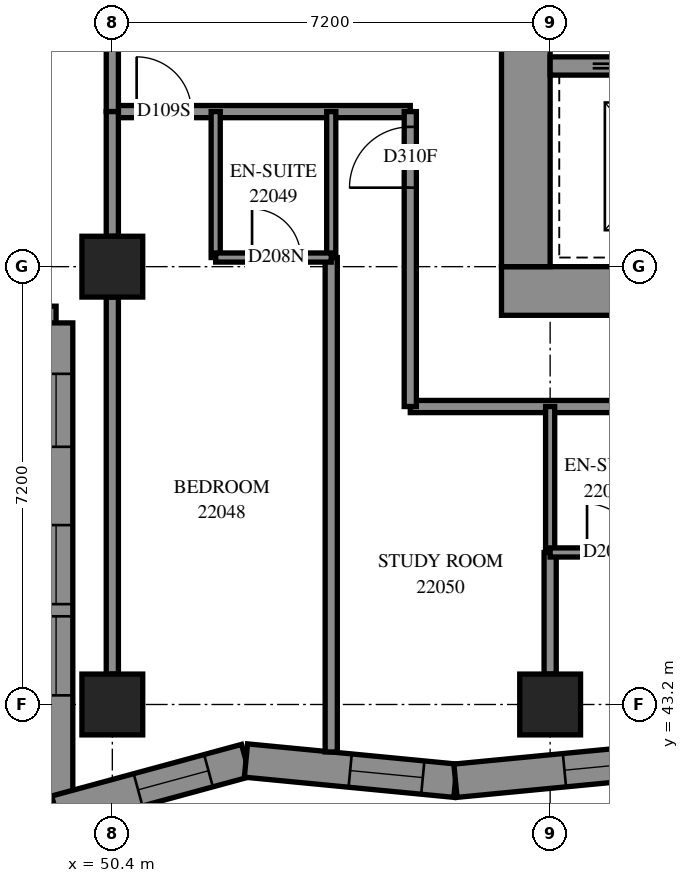
"""IFC4 building model, lengths in metres.
Left out: names, types, materials, properties, quantities, classifications, styles, units other than length and angle.
Written with IfcOpenShell. Run it as: python <this file> out.ifc"""

import sys

from ifc_helpers import new_model, si_unit, direction, frame, frame_2d, origin, origin_2d, place, context, subcontext, project, spatial, polyline, rectangle, outline, extrude, element, fill, save


model = new_model("IFC4")
c1 = context("Model", 3, precision=1e-05, world=origin(), true_north=direction((0.0, 1.0)))
c2 = subcontext(c1, "Body", "Model", "MODEL_VIEW")
j1 = project(units=[si_unit("LENGTHUNIT", "METRE"), si_unit("PLANEANGLEUNIT", "RADIAN")], contexts=[c1])
p1 = place(None, origin())
s1 = spatial("IfcSite", under=j1, at=p1, CompositionType="ELEMENT")
p2 = place(p1, origin())
s2 = spatial("IfcBuilding", under=s1, at=p2, CompositionType="ELEMENT")
p3 = place(p2, frame((0.0, 0.0, 84.6)))
s3 = spatial("IfcBuildingStorey", under=s2, at=p3, CompositionType="ELEMENT", Elevation=84.6)
for number, where, z_axis, x_axis in (
    (1, (50.4, 43.2, 0.0), (0.0, 0.0, 1.0), (1.0, 0.0, 0.0)),
    (2, (50.4, 50.4, 0.0), (0.0, 0.0, 1.0), (1.0, 0.0, 0.0)),
    (3, (57.6, 43.2, 0.0), (0.0, 0.0, 1.0), (1.0, 0.0, 0.0)),
):
    element("IfcColumn", number, at=place(p3, frame(where, z_axis=z_axis, x_axis=x_axis)), inside=s3, PredefinedType="COLUMN", context=c2, shape_type="SweptSolid", body=[
        extrude(rectangle(XDim=1.0, YDim=1.0, at=origin_2d()), origin(), (0.0, 0.0, 1.0), 3.1),
    ])
p4 = place(p3, frame((56.8, 50.0, -0.3), z_axis=(0.0, 0.0, 1.0), x_axis=(1.0, 0.0, 0.0)))
e4 = element("IfcWall", 4, at=p4, inside=s3, PredefinedType="SHEAR", context=c2, shape_type="SweptSolid", body=[
    extrude(rectangle(XDim=16.0, YDim=0.8, at=frame_2d((8.0, 0.0))), origin(), (0.0, 0.0, 1.0), 2.7),
])
p5 = place(p3, frame((57.2, 50.4, -0.3), z_axis=(0.0, 0.0, 1.0), x_axis=(0.0, 1.0, 0.0)))
e5 = element("IfcWall", 5, at=p5, inside=s3, PredefinedType="SHEAR", context=c2, shape_type="SweptSolid", body=[
    extrude(rectangle(XDim=14.4, YDim=0.8, at=frame_2d((7.2, 0.0))), origin(), (0.0, 0.0, 1.0), 2.7),
])
p6 = place(p5, frame((4.55, 0.0, 0.3)))
e6 = element("IfcOpeningElement", 6, at=p6, cuts=e5, PredefinedType="OPENING", context=c2, shape_type="SweptSolid", body=[
    extrude(rectangle(XDim=1.1, YDim=2.1, at=frame_2d((0.55, 1.05))), frame((0.0, 0.41, 0.0), z_axis=(0.0, -1.0, 0.0), x_axis=(1.0, 0.0, 0.0)), (0.0, 0.0, 1.0), 0.82),
])
p7 = place(p5, frame((11.35, 0.0, 0.3)))
e7 = element("IfcOpeningElement", 7, at=p7, cuts=e5, PredefinedType="OPENING", context=c2, shape_type="SweptSolid", body=[
    extrude(rectangle(XDim=1.1, YDim=2.1, at=frame_2d((0.55, 1.05))), frame((0.0, 0.41, 0.0), z_axis=(0.0, -1.0, 0.0), x_axis=(1.0, 0.0, 0.0)), (0.0, 0.0, 1.0), 0.82),
])
p8 = place(p3, frame((57.6, 53.7, 0.0), z_axis=(0.0, 0.0, 1.0), x_axis=(1.0, 0.0, 0.0)))
e8 = element("IfcWall", 8, at=p8, inside=s3, PredefinedType="SOLIDWALL", context=c2, shape_type="SweptSolid", body=[
    extrude(rectangle(XDim=14.4, YDim=0.3, at=frame_2d((7.2, 0.0))), origin(), (0.0, 0.0, 1.0), 3.1),
])
p9 = place(p8, frame((1.25, 0.0, 0.0)))
e9 = element("IfcOpeningElement", 9, at=p9, cuts=e8, PredefinedType="OPENING", context=c2, shape_type="SweptSolid", body=[
    extrude(rectangle(XDim=1.1, YDim=2.1, at=frame_2d((0.55, 1.05))), frame((0.0, 0.16, 0.0), z_axis=(0.0, -1.0, 0.0), x_axis=(1.0, 0.0, 0.0)), (0.0, 0.0, 1.0), 0.32),
])
p10 = place(p8, frame((4.85, 0.0, 0.0)))
e10 = element("IfcOpeningElement", 10, at=p10, cuts=e8, PredefinedType="OPENING", context=c2, shape_type="SweptSolid", body=[
    extrude(rectangle(XDim=1.1, YDim=2.1, at=frame_2d((0.55, 1.05))), frame((0.0, 0.16, 0.0), z_axis=(0.0, -1.0, 0.0), x_axis=(1.0, 0.0, 0.0)), (0.0, 0.0, 1.0), 0.32),
])
p11 = place(p8, frame((8.45, 0.0, 0.0)))
e11 = element("IfcOpeningElement", 11, at=p11, cuts=e8, PredefinedType="OPENING", context=c2, shape_type="SweptSolid", body=[
    extrude(rectangle(XDim=1.1, YDim=2.1, at=frame_2d((0.55, 1.05))), frame((0.0, 0.16, 0.0), z_axis=(0.0, -1.0, 0.0), x_axis=(1.0, 0.0, 0.0)), (0.0, 0.0, 1.0), 0.32),
])
p12 = place(p8, frame((12.05, 0.0, 0.0)))
e12 = element("IfcOpeningElement", 12, at=p12, cuts=e8, PredefinedType="OPENING", context=c2, shape_type="SweptSolid", body=[
    extrude(rectangle(XDim=1.1, YDim=2.1, at=frame_2d((0.55, 1.05))), frame((0.0, 0.16, 0.0), z_axis=(0.0, -1.0, 0.0), x_axis=(1.0, 0.0, 0.0)), (0.0, 0.0, 1.0), 0.32),
])
p13 = place(p3, frame((42.275, 49.475, 0.0), z_axis=(0.0, 0.0, 1.0), x_axis=(1.0, 0.0, 0.0)))
e13 = element("IfcWall", 13, at=p13, inside=s3, PredefinedType="SOLIDWALL", context=c2, shape_type="SweptSolid", body=[
    extrude(outline(polyline([(-0.275, -0.275), (6.925, -0.275), (7.475, 0.275), (0.275, 0.275), (-0.275, -0.275)])), origin(), (0.0, 0.0, 1.0), 3.1),
])
p14 = place(p13, frame((1.325, 0.0, 0.5)))
e14 = element("IfcOpeningElement", 14, at=p14, cuts=e13, PredefinedType="OPENING", context=c2, shape_type="SweptSolid", body=[
    extrude(rectangle(XDim=1.3, YDim=2.45, at=frame_2d((0.65, 1.225))), frame((0.0, 0.285, 0.0), z_axis=(0.0, -1.0, 0.0), x_axis=(1.0, 0.0, 0.0)), (0.0, 0.0, 1.0), 0.57),
])
p15 = place(p13, frame((2.825, 0.0, 0.5)))
e15 = element("IfcOpeningElement", 15, at=p15, cuts=e13, PredefinedType="OPENING", context=c2, shape_type="SweptSolid", body=[
    extrude(rectangle(XDim=1.3, YDim=2.45, at=frame_2d((0.65, 1.225))), frame((0.0, 0.285, 0.0), z_axis=(0.0, -1.0, 0.0), x_axis=(1.0, 0.0, 0.0)), (0.0, 0.0, 1.0), 0.57),
])
p16 = place(p13, frame((5.162, 0.0, 0.5)))
e16 = element("IfcOpeningElement", 16, at=p16, cuts=e13, PredefinedType="OPENING", context=c2, shape_type="SweptSolid", body=[
    extrude(rectangle(XDim=1.2, YDim=2.45, at=frame_2d((0.6, 1.225))), frame((0.0, 0.285, 0.0), z_axis=(0.0, -1.0, 0.0), x_axis=(1.0, 0.0, 0.0)), (0.0, 0.0, 1.0), 0.57),
])
p17 = place(p3, frame((49.475, 49.475, 0.0), z_axis=(0.0, 0.0, 1.0), x_axis=(0.0, -1.0, 0.0)))
e17 = element("IfcWall", 17, at=p17, inside=s3, PredefinedType="SOLIDWALL", context=c2, shape_type="SweptSolid", body=[
    extrude(outline(polyline([(0.275, -0.275), (8.405, -0.275), (7.686, 0.275), (-0.275, 0.275), (0.275, -0.275)])), origin(), (0.0, 0.0, 1.0), 3.1),
])
p18 = place(p17, frame((3.325, 0.0, 0.5)))
e18 = element("IfcOpeningElement", 18, at=p18, cuts=e17, PredefinedType="OPENING", context=c2, shape_type="SweptSolid", body=[
    extrude(rectangle(XDim=1.3, YDim=2.45, at=frame_2d((0.65, 1.225))), frame((0.0, 0.285, 0.0), z_axis=(0.0, -1.0, 0.0), x_axis=(1.0, 0.0, 0.0)), (0.0, 0.0, 1.0), 0.57),
])
p19 = place(p17, frame((4.825, 0.0, 0.5)))
e19 = element("IfcOpeningElement", 19, at=p19, cuts=e17, PredefinedType="OPENING", context=c2, shape_type="SweptSolid", body=[
    extrude(rectangle(XDim=1.3, YDim=2.45, at=frame_2d((0.65, 1.225))), frame((0.0, 0.285, 0.0), z_axis=(0.0, -1.0, 0.0), x_axis=(1.0, 0.0, 0.0)), (0.0, 0.0, 1.0), 0.57),
])
p20 = place(p17, frame((0.838, 0.0, 0.5)))
e20 = element("IfcOpeningElement", 20, at=p20, cuts=e17, PredefinedType="OPENING", context=c2, shape_type="SweptSolid", body=[
    extrude(rectangle(XDim=1.2, YDim=2.45, at=frame_2d((0.6, 1.225))), frame((0.0, 0.285, 0.0), z_axis=(0.0, -1.0, 0.0), x_axis=(1.0, 0.0, 0.0)), (0.0, 0.0, 1.0), 0.57),
])
p21 = place(p3, frame((49.475, 41.43, 0.0), z_axis=(0.0, 0.0, 1.0), x_axis=(0.9649788617, 0.262327651, 0.0)))
e21 = element("IfcWall", 21, at=p21, inside=s3, PredefinedType="SOLIDWALL", context=c2, shape_type="SweptSolid", body=[
    extrude(outline(polyline([(-0.36, -0.275), (3.186, -0.275), (3.286, 0.275), (0.36, 0.275), (-0.36, -0.275)])), origin(), (0.0, 0.0, 1.0), 3.1),
])
p22 = place(p21, frame((1.397, 0.0, 0.5)))
e22 = element("IfcOpeningElement", 22, at=p22, cuts=e21, PredefinedType="OPENING", context=c2, shape_type="SweptSolid", body=[
    extrude(rectangle(XDim=1.2, YDim=2.45, at=frame_2d((0.6, 1.225))), frame((0.0, 0.285, 0.0), z_axis=(0.0, -1.0, 0.0), x_axis=(1.0, 0.0, 0.0)), (0.0, 0.0, 1.0), 0.57),
])
p23 = place(p3, frame((52.598, 42.279, 0.0), z_axis=(0.0, 0.0, 1.0), x_axis=(0.9953800797, -0.0960130045, 0.0)))
e23 = element("IfcWall", 23, at=p23, inside=s3, PredefinedType="SOLIDWALL", context=c2, shape_type="SweptSolid", body=[
    extrude(outline(polyline([(0.05, -0.275), (3.487, -0.275), (3.434, 0.275), (-0.05, 0.275), (0.05, -0.275)])), origin(), (0.0, 0.0, 1.0), 3.1),
])
p24 = place(p23, frame((1.722, 0.0, 0.5)))
e24 = element("IfcOpeningElement", 24, at=p24, cuts=e23, PredefinedType="OPENING", context=c2, shape_type="SweptSolid", body=[
    extrude(rectangle(XDim=1.2, YDim=2.45, at=frame_2d((0.6, 1.225))), frame((0.0, 0.285, 0.0), z_axis=(0.0, -1.0, 0.0), x_axis=(1.0, 0.0, 0.0)), (0.0, 0.0, 1.0), 0.57),
])
p25 = place(p3, frame((56.043, 41.946, 0.0), z_axis=(0.0, 0.0, 1.0), x_axis=(0.995380467, 0.096008989, 0.0)))
e25 = element("IfcWall", 25, at=p25, inside=s3, PredefinedType="SOLIDWALL", context=c2, shape_type="SweptSolid", body=[
    extrude(outline(polyline([(-0.026, -0.275), (3.411, -0.275), (3.464, 0.275), (0.026, 0.275), (-0.026, -0.275)])), origin(), (0.0, 0.0, 1.0), 3.1),
])
p26 = place(p25, frame((1.801, 0.0, 0.5)))
e26 = element("IfcOpeningElement", 26, at=p26, cuts=e25, PredefinedType="OPENING", context=c2, shape_type="SweptSolid", body=[
    extrude(rectangle(XDim=1.2, YDim=2.45, at=frame_2d((0.6, 1.225))), frame((0.0, 0.285, 0.0), z_axis=(0.0, -1.0, 0.0), x_axis=(1.0, 0.0, 0.0)), (0.0, 0.0, 1.0), 0.57),
])
p27 = place(p3, frame((55.3, 48.1, 0.0), z_axis=(0.0, 0.0, 1.0), x_axis=(1.0, 0.0, 0.0)))
e27 = element("IfcWall", 27, at=p27, inside=s3, PredefinedType="PARTITIONING", context=c2, shape_type="SweptSolid", body=[
    extrude(rectangle(XDim=19.092, YDim=0.2, at=frame_2d((9.546, 0.0))), origin(), (0.0, 0.0, 1.0), 3.1),
])
p28 = place(p27, frame((6.199, 0.0, 0.0)))
e28 = element("IfcOpeningElement", 28, at=p28, cuts=e27, PredefinedType="OPENING", context=c2, shape_type="SweptSolid", body=[
    extrude(rectangle(XDim=0.9, YDim=2.1, at=frame_2d((0.45, 1.05))), frame((0.0, 0.11, 0.0), z_axis=(0.0, -1.0, 0.0), x_axis=(1.0, 0.0, 0.0)), (0.0, 0.0, 1.0), 0.22),
])
p29 = place(p27, frame((13.363, 0.0, 0.0)))
e29 = element("IfcOpeningElement", 29, at=p29, cuts=e27, PredefinedType="OPENING", context=c2, shape_type="SweptSolid", body=[
    extrude(rectangle(XDim=1.0, YDim=2.1, at=frame_2d((0.5, 1.05))), frame((0.0, 0.11, 0.0), z_axis=(0.0, -1.0, 0.0), x_axis=(1.0, 0.0, 0.0)), (0.0, 0.0, 1.0), 0.22),
])
p30 = place(p3, frame((54.0, 42.42, 0.0), z_axis=(0.0, 0.0, 1.0), x_axis=(0.0, 1.0, 0.0)))
e30 = element("IfcWall", 30, at=p30, inside=s3, PredefinedType="PARTITIONING", context=c2, shape_type="SweptSolid", body=[
    extrude(rectangle(XDim=8.13, YDim=0.2, at=frame_2d((4.065, 0.0))), origin(), (0.0, 0.0, 1.0), 3.1),
])
p31 = place(p3, frame((50.4, 43.7, 0.0), z_axis=(0.0, 0.0, 1.0), x_axis=(0.0, 1.0, 0.0)))
e31 = element("IfcWall", 31, at=p31, inside=s3, PredefinedType="PARTITIONING", context=c2, shape_type="SweptSolid", body=[
    extrude(rectangle(XDim=6.2, YDim=0.2, at=frame_2d((3.1, 0.0))), origin(), (0.0, 0.0, 1.0), 2.6),
])
p32 = place(p3, frame((50.4, 52.95, 0.0), z_axis=(0.0, 0.0, 1.0), x_axis=(1.0, 0.0, 0.0)))
e32 = element("IfcWall", 32, at=p32, inside=s3, PredefinedType="PARTITIONING", context=c2, shape_type="SweptSolid", body=[
    extrude(rectangle(XDim=4.9, YDim=0.2, at=frame_2d((2.45, 0.0))), origin(), (0.0, 0.0, 1.0), 3.1),
])
p33 = place(p32, frame((0.4, 0.0, 0.0)))
e33 = element("IfcOpeningElement", 33, at=p33, cuts=e32, PredefinedType="OPENING", context=c2, shape_type="SweptSolid", body=[
    extrude(rectangle(XDim=0.9, YDim=2.1, at=frame_2d((0.45, 1.05))), frame((0.0, 0.11, 0.0), z_axis=(0.0, -1.0, 0.0), x_axis=(1.0, 0.0, 0.0)), (0.0, 0.0, 1.0), 0.22),
])
p34 = place(p3, frame((55.3, 48.1, 0.0), z_axis=(0.0, 0.0, 1.0), x_axis=(0.0, 1.0, 0.0)))
e34 = element("IfcWall", 34, at=p34, inside=s3, PredefinedType="PARTITIONING", context=c2, shape_type="SweptSolid", body=[
    extrude(rectangle(XDim=4.85, YDim=0.2, at=frame_2d((2.425, 0.0))), origin(), (0.0, 0.0, 1.0), 3.1),
])
p35 = place(p34, frame((3.599, 0.0, 0.0)))
e35 = element("IfcOpeningElement", 35, at=p35, cuts=e34, PredefinedType="OPENING", context=c2, shape_type="SweptSolid", body=[
    extrude(rectangle(XDim=1.0, YDim=2.1, at=frame_2d((0.5, 1.05))), frame((0.0, 0.11, 0.0), z_axis=(0.0, -1.0, 0.0), x_axis=(1.0, 0.0, 0.0)), (0.0, 0.0, 1.0), 0.22),
])
for number, where, z_axis, x_axis in (
    (36, (52.1, 50.55, 0.0), (0.0, 0.0, 1.0), (0.0, 1.0, 0.0)),
    (37, (54.0, 50.55, 0.0), (0.0, 0.0, 1.0), (0.0, 1.0, 0.0)),
    (38, (57.6, 45.7, 0.0), (0.0, 0.0, 1.0), (0.0, 1.0, 0.0)),
):
    element("IfcWall", number, at=place(p3, frame(where, z_axis=z_axis, x_axis=x_axis)), inside=s3, PredefinedType="PARTITIONING", context=c2, shape_type="SweptSolid", body=[
        extrude(rectangle(XDim=2.4, YDim=0.15, at=frame_2d((1.2, 0.0))), origin(), (0.0, 0.0, 1.0), 3.1),
    ])
p36 = place(p3, frame((50.4, 52.95, 0.0), z_axis=(0.0, 0.0, 1.0), x_axis=(0.0, 1.0, 0.0)))
e39 = element("IfcWall", 39, at=p36, inside=s3, PredefinedType="PARTITIONING", context=c2, shape_type="SweptSolid", body=[
    extrude(rectangle(XDim=2.1, YDim=0.2, at=frame_2d((1.05, 0.0))), origin(), (0.0, 0.0, 1.0), 3.1),
])
p37 = place(p3, frame((50.4, 50.9, 0.0), z_axis=(0.0, 0.0, 1.0), x_axis=(0.0, 1.0, 0.0)))
e40 = element("IfcWall", 40, at=p37, inside=s3, PredefinedType="PARTITIONING", context=c2, shape_type="SweptSolid", body=[
    extrude(rectangle(XDim=2.05, YDim=0.2, at=frame_2d((1.025, 0.0))), origin(), (0.0, 0.0, 1.0), 3.1),
])
p38 = place(p3, frame((57.6, 43.7, 0.0), z_axis=(0.0, 0.0, 1.0), x_axis=(0.0, 1.0, 0.0)))
e41 = element("IfcWall", 41, at=p38, inside=s3, PredefinedType="PARTITIONING", context=c2, shape_type="SweptSolid", body=[
    extrude(rectangle(XDim=2.0, YDim=0.2, at=frame_2d((1.0, 0.0))), origin(), (0.0, 0.0, 1.0), 3.1),
])
p39 = place(p3, frame((52.1, 50.55, 0.0), z_axis=(0.0, 0.0, 1.0), x_axis=(1.0, 0.0, 0.0)))
e42 = element("IfcWall", 42, at=p39, inside=s3, PredefinedType="PARTITIONING", context=c2, shape_type="SweptSolid", body=[
    extrude(rectangle(XDim=1.9, YDim=0.15, at=frame_2d((0.95, 0.0))), origin(), (0.0, 0.0, 1.0), 3.1),
])
p40 = place(p39, frame((0.598, 0.0, 0.0)))
e43 = element("IfcOpeningElement", 43, at=p40, cuts=e42, PredefinedType="OPENING", context=c2, shape_type="SweptSolid", body=[
    extrude(rectangle(XDim=0.8, YDim=2.1, at=frame_2d((0.4, 1.05))), frame((0.0, 0.085, 0.0), z_axis=(0.0, -1.0, 0.0), x_axis=(1.0, 0.0, 0.0)), (0.0, 0.0, 1.0), 0.17),
])
p41 = place(p3, frame((57.6, 45.7, 0.0), z_axis=(0.0, 0.0, 1.0), x_axis=(1.0, 0.0, 0.0)))
e44 = element("IfcWall", 44, at=p41, inside=s3, PredefinedType="PARTITIONING", context=c2, shape_type="SweptSolid", body=[
    extrude(rectangle(XDim=1.9, YDim=0.15, at=frame_2d((0.95, 0.0))), origin(), (0.0, 0.0, 1.0), 3.1),
])
p42 = place(p41, frame((0.607, 0.0, 0.0)))
e45 = element("IfcOpeningElement", 45, at=p42, cuts=e44, PredefinedType="OPENING", context=c2, shape_type="SweptSolid", body=[
    extrude(rectangle(XDim=0.8, YDim=2.1, at=frame_2d((0.4, 1.05))), frame((0.0, 0.085, 0.0), z_axis=(0.0, -1.0, 0.0), x_axis=(1.0, 0.0, 0.0)), (0.0, 0.0, 1.0), 0.17),
])
p43 = place(p18, origin())
e46 = element("IfcWindow", 46, at=p43, inside=s3, PartitioningType="SINGLE_PANEL", PredefinedType="WINDOW", context=c2, shape_type="SweptSolid", body=[
    extrude(rectangle(XDim=1.3, YDim=2.45, at=frame_2d((0.65, 1.225))), frame((0.0, 0.155, 0.0), z_axis=(0.0, -1.0, 0.0), x_axis=(1.0, 0.0, 0.0)), (0.0, 0.0, 1.0), 0.06),
])
fill(e18, e46)
p44 = place(p19, origin())
e47 = element("IfcWindow", 47, at=p44, inside=s3, PartitioningType="SINGLE_PANEL", PredefinedType="WINDOW", context=c2, shape_type="SweptSolid", body=[
    extrude(rectangle(XDim=1.3, YDim=2.45, at=frame_2d((0.65, 1.225))), frame((0.0, 0.155, 0.0), z_axis=(0.0, -1.0, 0.0), x_axis=(1.0, 0.0, 0.0)), (0.0, 0.0, 1.0), 0.06),
])
fill(e19, e47)
p45 = place(p20, origin())
e48 = element("IfcWindow", 48, at=p45, inside=s3, PartitioningType="SINGLE_PANEL", PredefinedType="WINDOW", context=c2, shape_type="SweptSolid", body=[
    extrude(rectangle(XDim=1.2, YDim=2.45, at=frame_2d((0.6, 1.225))), frame((0.0, 0.155, 0.0), z_axis=(0.0, -1.0, 0.0), x_axis=(1.0, 0.0, 0.0)), (0.0, 0.0, 1.0), 0.06),
])
fill(e20, e48)
p46 = place(p22, origin())
e49 = element("IfcWindow", 49, at=p46, inside=s3, PartitioningType="SINGLE_PANEL", PredefinedType="WINDOW", context=c2, shape_type="SweptSolid", body=[
    extrude(rectangle(XDim=1.2, YDim=2.45, at=frame_2d((0.6, 1.225))), frame((0.0, 0.155, 0.0), z_axis=(0.0, -1.0, 0.0), x_axis=(1.0, 0.0, 0.0)), (0.0, 0.0, 1.0), 0.06),
])
fill(e22, e49)
p47 = place(p24, origin())
e50 = element("IfcWindow", 50, at=p47, inside=s3, PartitioningType="SINGLE_PANEL", PredefinedType="WINDOW", context=c2, shape_type="SweptSolid", body=[
    extrude(rectangle(XDim=1.2, YDim=2.45, at=frame_2d((0.6, 1.225))), frame((0.0, 0.155, 0.0), z_axis=(0.0, -1.0, 0.0), x_axis=(1.0, 0.0, 0.0)), (0.0, 0.0, 1.0), 0.06),
])
fill(e24, e50)
p48 = place(p26, origin())
e51 = element("IfcWindow", 51, at=p48, inside=s3, PartitioningType="SINGLE_PANEL", PredefinedType="WINDOW", context=c2, shape_type="SweptSolid", body=[
    extrude(rectangle(XDim=1.2, YDim=2.45, at=frame_2d((0.6, 1.225))), frame((0.0, 0.155, 0.0), z_axis=(0.0, -1.0, 0.0), x_axis=(1.0, 0.0, 0.0)), (0.0, 0.0, 1.0), 0.06),
])
fill(e26, e51)
p49 = place(p33, origin())
e52 = element("IfcDoor", 52, at=p49, inside=s3, OperationType="SINGLE_SWING_LEFT", PredefinedType="DOOR", context=c2, shape_type="SweptSolid", body=[
    extrude(rectangle(XDim=0.9, YDim=2.1, at=frame_2d((0.45, 1.05))), frame((0.0, 0.025, 0.0), z_axis=(0.0, -1.0, 0.0), x_axis=(1.0, 0.0, 0.0)), (0.0, 0.0, 1.0), 0.05),
])
fill(e33, e52)
p50 = place(p40, origin())
e53 = element("IfcDoor", 53, at=p50, inside=s3, OperationType="SINGLE_SWING_RIGHT", PredefinedType="DOOR", context=c2, shape_type="SweptSolid", body=[
    extrude(rectangle(XDim=0.8, YDim=2.1, at=frame_2d((0.4, 1.05))), frame((0.0, 0.025, 0.0), z_axis=(0.0, -1.0, 0.0), x_axis=(1.0, 0.0, 0.0)), (0.0, 0.0, 1.0), 0.05),
])
fill(e43, e53)
p51 = place(p35, origin())
e54 = element("IfcDoor", 54, at=p51, inside=s3, OperationType="SINGLE_SWING_RIGHT", PredefinedType="DOOR", context=c2, shape_type="SweptSolid", body=[
    extrude(rectangle(XDim=1.0, YDim=2.1, at=frame_2d((0.5, 1.05))), frame((0.0, 0.025, 0.0), z_axis=(0.0, -1.0, 0.0), x_axis=(1.0, 0.0, 0.0)), (0.0, 0.0, 1.0), 0.05),
])
fill(e35, e54)
p52 = place(p42, origin())
e55 = element("IfcDoor", 55, at=p52, inside=s3, OperationType="SINGLE_SWING_RIGHT", PredefinedType="DOOR", context=c2, shape_type="SweptSolid", body=[
    extrude(rectangle(XDim=0.8, YDim=2.1, at=frame_2d((0.4, 1.05))), frame((0.0, 0.025, 0.0), z_axis=(0.0, -1.0, 0.0), x_axis=(1.0, 0.0, 0.0)), (0.0, 0.0, 1.0), 0.05),
])
fill(e45, e55)
save(model, sys.argv[1])
